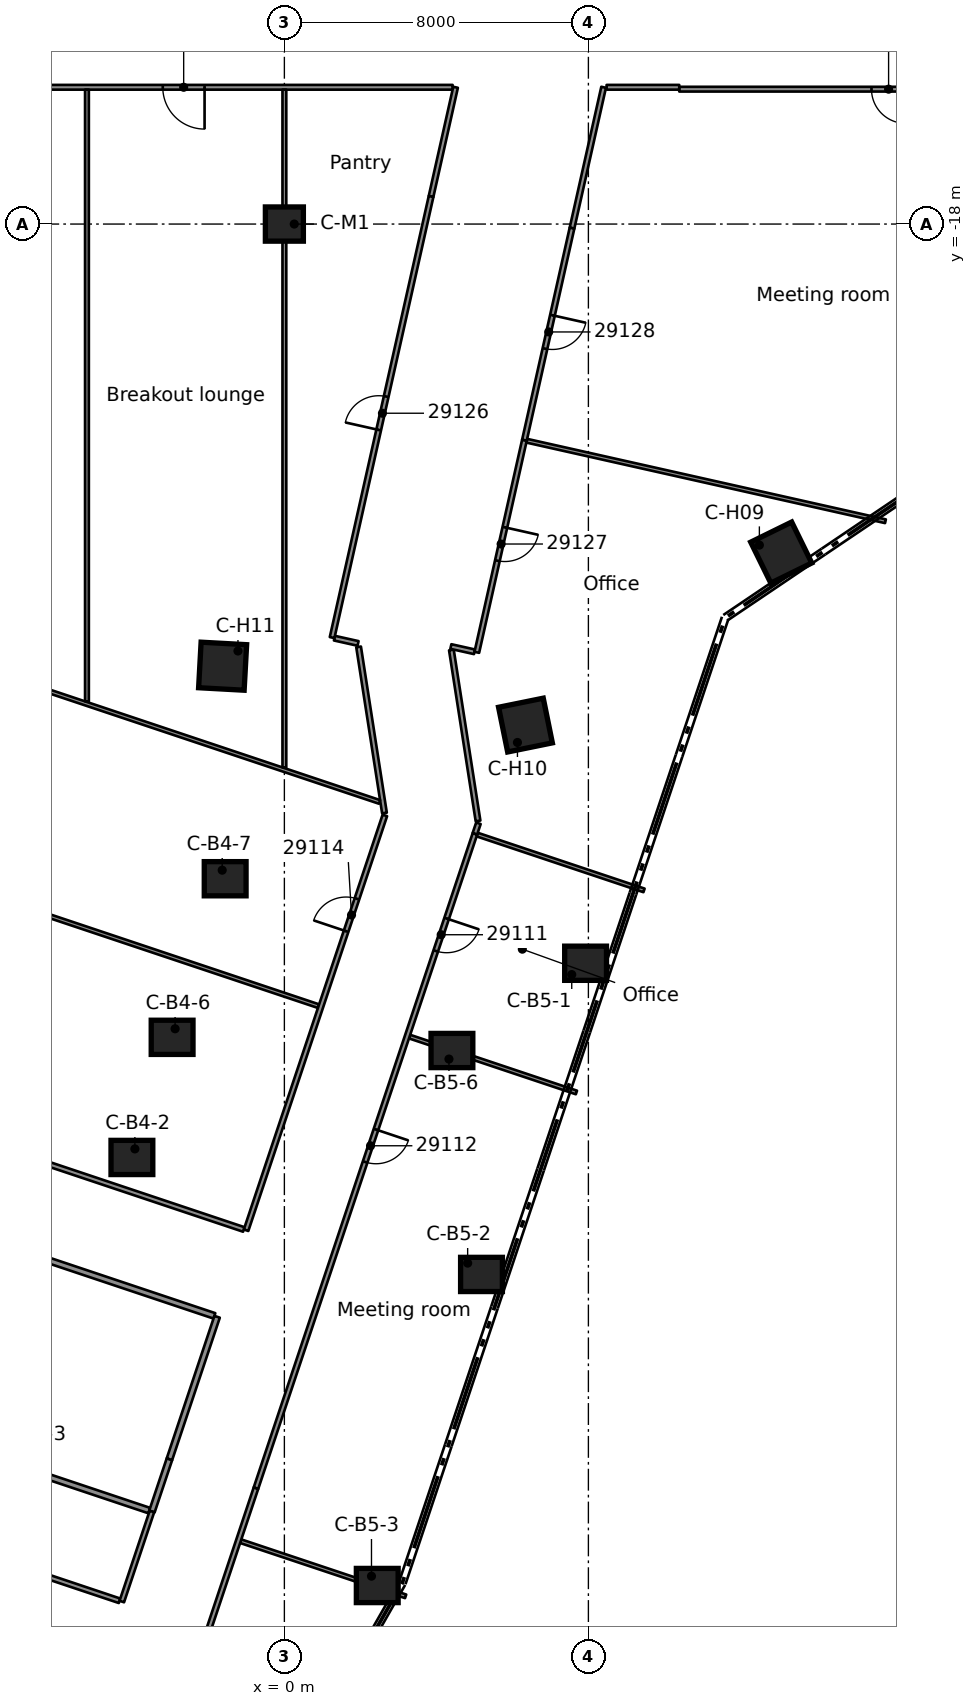
"""IFC4 building model, lengths in metres.
Left out: names, types, materials, properties, quantities, classifications, styles, units other than length and angle.
Written with IfcOpenShell. Run it as: python <this file> out.ifc"""

import sys

from ifc_helpers import new_model, si_unit, direction, frame, frame_2d, origin, origin_2d, place, context, subcontext, project, spatial, rectangle, extrude, element, fill, save


model = new_model("IFC4")
c1 = context("Model", 3, precision=1e-05, world=origin(), true_north=direction((0.0, 1.0)))
c2 = subcontext(c1, "Body", "Model", "MODEL_VIEW")
j1 = project(units=[si_unit("LENGTHUNIT", "METRE"), si_unit("PLANEANGLEUNIT", "RADIAN")], contexts=[c1])
p1 = place(None, origin())
s1 = spatial("IfcSite", under=j1, at=p1, CompositionType="ELEMENT")
p2 = place(p1, origin())
s2 = spatial("IfcBuilding", under=s1, at=p2, CompositionType="ELEMENT")
p3 = place(p2, frame((0.0, 0.0, 149.1)))
s3 = spatial("IfcBuildingStorey", under=s2, at=p3, CompositionType="ELEMENT", Elevation=149.1)
for number, where, z_axis, x_axis in (
    (1, (-4.012, -42.56, 0.0), (0.0, 0.0, 1.0), (1.0, 0.0, 0.0)),
    (2, (-2.954, -39.399, 0.0), (0.0, 0.0, 1.0), (1.0, 0.0, 0.0)),
    (3, (-1.558, -35.226, 0.0), (0.0, 0.0, 1.0), (1.0, 0.0, 0.0)),
    (4, (7.926, -37.45, 0.0), (0.0, 0.0, 1.0), (1.0, 0.0, 0.0)),
    (5, (5.187, -45.638, 0.0), (0.0, 0.0, 1.0), (1.0, 0.0, 0.0)),
    (6, (2.444, -53.823, 0.0), (0.0, 0.0, 1.0), (1.0, 0.0, 0.0)),
    (7, (4.409, -39.746, 0.0), (0.0, 0.0, 1.0), (1.0, 0.0, 0.0)),
):
    element("IfcColumn", number, at=place(p3, frame(where, z_axis=z_axis, x_axis=x_axis)), inside=s3, PredefinedType="COLUMN", context=c2, shape_type="SweptSolid", body=[
        extrude(rectangle(XDim=1.1, YDim=0.9, at=origin_2d()), origin(), (0.0, 0.0, 1.0), 3.5),
    ])
for number, where, z_axis, x_axis in (
    (8, (13.075, -26.644, 0.0), (0.0, 0.0, 1.0), (0.441, -0.898, 0.0)),
    (9, (6.344, -31.183, 0.0), (0.0, 0.0, 1.0), (0.199, -0.98, 0.0)),
    (10, (-1.625, -29.634, 0.0), (0.0, 0.0, 1.0), (-0.055, -0.998, 0.0)),
):
    element("IfcColumn", number, at=place(p3, frame(where, z_axis=z_axis, x_axis=x_axis)), inside=s3, PredefinedType="COLUMN", context=c2, shape_type="SweptSolid", body=[
        extrude(rectangle(XDim=1.2, YDim=1.2, at=origin_2d()), origin(), (0.0, 0.0, 1.0), 3.5),
    ])
p4 = place(p3, frame((0.0, -18.0, 0.0), z_axis=(0.0, 0.0, 1.0), x_axis=(1.0, 0.0, 0.0)))
e11 = element("IfcColumn", 11, at=p4, inside=s3, PredefinedType="COLUMN", context=c2, shape_type="SweptSolid", body=[
    extrude(rectangle(XDim=1.0, YDim=0.9, at=origin_2d()), origin(), (0.0, 0.0, 1.0), 3.5),
])
p5 = place(p3, frame((2.634, -33.497, 0.0), z_axis=(0.0, 0.0, 1.0), x_axis=(-0.153972826204, 0.988075082567, 0.0)))
e12 = element("IfcWall", 12, at=p5, inside=s3, PredefinedType="PARTITIONING", context=c2, shape_type="SweptSolid", body=[
    extrude(rectangle(XDim=4.424, YDim=0.125, at=frame_2d((2.212, 0.0))), origin(), (0.0, 0.0, 1.0), 3.08),
])
p6 = place(p3, frame((4.395, -29.207, 0.0), z_axis=(0.0, 0.0, 1.0), x_axis=(0.153971141753, -0.988075345056, 0.0)))
e13 = element("IfcWall", 13, at=p6, inside=s3, PredefinedType="PARTITIONING", context=c2, shape_type="SweptSolid", body=[
    extrude(rectangle(XDim=4.552, YDim=0.125, at=frame_2d((2.276, 0.0))), origin(), (0.0, 0.0, 1.0), 3.08),
])
p7 = place(p3, frame((-2.94, -57.547, 0.0), z_axis=(0.0, 0.0, 1.0), x_axis=(-0.948265401731, 0.317478704609, 0.0)))
e14 = element("IfcWall", 14, at=p7, inside=s3, PredefinedType="PARTITIONING", context=c2, shape_type="SweptSolid", body=[
    extrude(rectangle(XDim=30.966, YDim=0.125, at=frame_2d((15.483, 0.0))), origin(), (0.0, 0.0, 1.0), 3.08),
])
p8 = place(p7, frame((9.415, 0.0, 0.0)))
e15 = element("IfcOpeningElement", 15, at=p8, cuts=e14, PredefinedType="OPENING", context=c2, shape_type="SweptSolid", body=[
    extrude(rectangle(XDim=0.9, YDim=2.1, at=frame_2d((0.45, 1.05))), frame((0.0, 0.073, 0.0), z_axis=(0.0, -1.0, 0.0), x_axis=(1.0, 0.0, 0.0)), (0.0, 0.0, 1.0), 0.145),
])
p9 = place(p7, frame((19.9, 0.0, 0.0)))
e16 = element("IfcOpeningElement", 16, at=p9, cuts=e14, PredefinedType="OPENING", context=c2, shape_type="SweptSolid", body=[
    extrude(rectangle(XDim=1.1, YDim=2.1, at=frame_2d((0.55, 1.05))), frame((0.0, 0.073, 0.0), z_axis=(0.0, -1.0, 0.0), x_axis=(1.0, 0.0, 0.0)), (0.0, 0.0, 1.0), 0.145),
])
p10 = place(p3, frame((-29.171, -45.917, 0.0), z_axis=(0.0, 0.0, 1.0), x_axis=(0.948337781815, -0.317262433299, 0.0)))
e17 = element("IfcWall", 17, at=p10, inside=s3, PredefinedType="PARTITIONING", context=c2, shape_type="SweptSolid", body=[
    extrude(rectangle(XDim=26.187, YDim=0.125, at=frame_2d((13.093, 0.0))), origin(), (0.0, 0.0, 1.0), 3.08),
])
p11 = place(p10, frame((12.538, 0.0, 0.0)))
e18 = element("IfcOpeningElement", 18, at=p11, cuts=e17, PredefinedType="OPENING", context=c2, shape_type="SweptSolid", body=[
    extrude(rectangle(XDim=0.9, YDim=2.1, at=frame_2d((0.45, 1.05))), frame((0.0, 0.073, 0.0), z_axis=(0.0, -1.0, 0.0), x_axis=(1.0, 0.0, 0.0)), (0.0, 0.0, 1.0), 0.145),
])
p12 = place(p3, frame((-28.366, -43.55, 0.0), z_axis=(0.0, 0.0, 1.0), x_axis=(0.948327152728, -0.317294203223, 0.0)))
e19 = element("IfcWall", 19, at=p12, inside=s3, PredefinedType="PARTITIONING", context=c2, shape_type="SweptSolid", body=[
    extrude(rectangle(XDim=26.162, YDim=0.15, at=frame_2d((13.081, 0.0))), origin(), (0.0, 0.0, 1.0), 3.08),
])
p13 = place(p3, frame((-1.149, -52.657, 0.0), z_axis=(0.0, 0.0, 1.0), x_axis=(0.948400148701, -0.317075949805, 0.0)))
e20 = element("IfcWall", 20, at=p13, inside=s3, PredefinedType="PARTITIONING", context=c2, shape_type="SweptSolid", body=[
    extrude(rectangle(XDim=4.576, YDim=0.1, at=frame_2d((2.288, 0.0))), origin(), (0.0, 0.0, 1.0), 3.08),
])
p14 = place(p3, frame((-1.841, -46.728, 0.0), z_axis=(0.0, 0.0, 1.0), x_axis=(-0.94832621322, 0.317297011205, 0.0)))
e21 = element("IfcWall", 21, at=p14, inside=s3, PredefinedType="PARTITIONING", context=c2, shape_type="SweptSolid", body=[
    extrude(rectangle(XDim=26.162, YDim=0.15, at=frame_2d((13.081, 0.0))), origin(), (0.0, 0.0, 1.0), 3.08),
])
p15 = place(p14, frame((12.525, 0.0, 0.0)))
e22 = element("IfcOpeningElement", 22, at=p15, cuts=e21, PredefinedType="OPENING", context=c2, shape_type="SweptSolid", body=[
    extrude(rectangle(XDim=0.9, YDim=2.1, at=frame_2d((0.45, 1.05))), frame((0.0, 0.085, 0.0), z_axis=(0.0, -1.0, 0.0), x_axis=(1.0, 0.0, 0.0)), (0.0, 0.0, 1.0), 0.17),
])
p16 = place(p3, frame((-25.901, -36.146, 0.0), z_axis=(0.0, 0.0, 1.0), x_axis=(0.948326561211, -0.317295971139, 0.0)))
e23 = element("IfcWall", 23, at=p16, inside=s3, PredefinedType="PARTITIONING", context=c2, shape_type="SweptSolid", body=[
    extrude(rectangle(XDim=26.187, YDim=0.125, at=frame_2d((13.094, 0.0))), origin(), (0.0, 0.0, 1.0), 3.08),
])
p17 = place(p3, frame((-23.935, -30.27, 0.0), z_axis=(0.0, 0.0, 1.0), x_axis=(0.948326561211, -0.317295971139, 0.0)))
e24 = element("IfcWall", 24, at=p17, inside=s3, PredefinedType="PARTITIONING", context=c2, shape_type="SweptSolid", body=[
    extrude(rectangle(XDim=26.187, YDim=0.1, at=frame_2d((13.094, 0.0))), origin(), (0.0, 0.0, 1.0), 3.08),
])
p18 = place(p3, frame((3.294, -39.38, 0.0), z_axis=(0.0, 0.0, 1.0), x_axis=(0.948260676976, -0.317492816455, 0.0)))
e25 = element("IfcWall", 25, at=p18, inside=s3, PredefinedType="PARTITIONING", context=c2, shape_type="SweptSolid", body=[
    extrude(rectangle(XDim=4.631, YDim=0.1, at=frame_2d((2.315, 0.0))), origin(), (0.0, 0.0, 1.0), 3.08),
])
p19 = place(p3, frame((-21.98, -25.012, 0.0), z_axis=(0.0, 0.0, 1.0), x_axis=(0.948312916699, -0.317336748614, 0.0)))
e26 = element("IfcWall", 26, at=p19, inside=s3, PredefinedType="PARTITIONING", context=c2, shape_type="SweptSolid", body=[
    extrude(rectangle(XDim=25.818, YDim=0.1, at=frame_2d((12.909, 0.0))), origin(), (0.0, 0.0, 1.0), 3.08),
])
p20 = place(p3, frame((5.072, -34.064, 0.0), z_axis=(0.0, 0.0, 1.0), x_axis=(0.948361239818, -0.317192305725, 0.0)))
e27 = element("IfcWall", 27, at=p20, inside=s3, PredefinedType="PARTITIONING", context=c2, shape_type="SweptSolid", body=[
    extrude(rectangle(XDim=4.631, YDim=0.1, at=frame_2d((2.316, 0.0))), origin(), (0.0, 0.0, 1.0), 3.08),
])
p21 = place(p3, frame((6.378, -23.701, 0.0), z_axis=(0.0, 0.0, 1.0), x_axis=(0.975712069102, -0.219056974802, 0.0)))
e28 = element("IfcWall", 28, at=p21, inside=s3, PredefinedType="PARTITIONING", context=c2, shape_type="SweptSolid", body=[
    extrude(rectangle(XDim=9.674, YDim=0.1, at=frame_2d((4.837, 0.0))), origin(), (0.0, 0.0, 1.0), 3.08),
])
p22 = place(p3, frame((1.317, -28.896, 0.0), z_axis=(0.0, 0.0, 1.0), x_axis=(0.9759612217, -0.217944244563, 0.0)))
e29 = element("IfcWall", 29, at=p22, inside=s3, PredefinedType="PARTITIONING", context=c2, shape_type="SweptSolid", body=[
    extrude(rectangle(XDim=0.637, YDim=0.125, at=frame_2d((0.319, 0.0))), origin(), (0.0, 0.0, 1.0), 3.08),
])
p23 = place(p3, frame((4.381, -29.116, 0.0), z_axis=(0.0, 0.0, 1.0), x_axis=(0.975943017671, -0.218025746782, 0.0)))
e30 = element("IfcWall", 30, at=p23, inside=s3, PredefinedType="PARTITIONING", context=c2, shape_type="SweptSolid", body=[
    extrude(rectangle(XDim=0.637, YDim=0.125, at=frame_2d((0.319, 0.0))), origin(), (0.0, 0.0, 1.0), 3.08),
])
p24 = place(p3, frame((21.387, -14.451, 0.0), z_axis=(0.0, 0.0, 1.0), x_axis=(-1.0, 0.0, 0.0)))
e31 = element("IfcWall", 31, at=p24, inside=s3, PredefinedType="PARTITIONING", context=c2, shape_type="SweptSolid", body=[
    extrude(rectangle(XDim=10.996, YDim=0.125, at=frame_2d((5.498, 0.0))), origin(), (0.0, 0.0, 1.0), 3.08),
])
p25 = place(p24, frame((5.038, 0.0, 0.0)))
e32 = element("IfcOpeningElement", 32, at=p25, cuts=e31, PredefinedType="OPENING", context=c2, shape_type="SweptSolid", body=[
    extrude(rectangle(XDim=0.9, YDim=2.1, at=frame_2d((0.45, 1.05))), frame((0.0, 0.073, 0.0), z_axis=(0.0, -1.0, 0.0), x_axis=(1.0, 0.0, 0.0)), (0.0, 0.0, 1.0), 0.145),
])
p26 = place(p3, frame((4.427, -14.401, 0.0), z_axis=(0.0, 0.0, 1.0), x_axis=(-1.0, 0.0, 0.0)))
e33 = element("IfcWall", 33, at=p26, inside=s3, PredefinedType="PARTITIONING", context=c2, shape_type="SweptSolid", body=[
    extrude(rectangle(XDim=14.817, YDim=0.125, at=frame_2d((7.408, 0.0))), origin(), (0.0, 0.0, 1.0), 3.08),
])
p27 = place(p26, frame((11.722, 0.0, 0.0)))
e34 = element("IfcOpeningElement", 34, at=p27, cuts=e33, PredefinedType="OPENING", context=c2, shape_type="SweptSolid", body=[
    extrude(rectangle(XDim=0.9, YDim=2.1, at=frame_2d((0.45, 1.05))), frame((0.0, 0.073, 0.0), z_axis=(0.0, -1.0, 0.0), x_axis=(1.0, 0.0, 0.0)), (0.0, 0.0, 1.0), 0.145),
])
p28 = place(p26, frame((6.527, 0.0, 0.0)))
e35 = element("IfcOpeningElement", 35, at=p28, cuts=e33, PredefinedType="OPENING", context=c2, shape_type="SweptSolid", body=[
    extrude(rectangle(XDim=1.1, YDim=2.1, at=frame_2d((0.55, 1.05))), frame((0.0, 0.073, 0.0), z_axis=(0.0, -1.0, 0.0), x_axis=(1.0, 0.0, 0.0)), (0.0, 0.0, 1.0), 0.145),
])
p29 = place(p3, frame((8.479, -14.401, 0.0), z_axis=(0.0, 0.0, 1.0), x_axis=(1.0, 0.0, 0.0)))
e36 = element("IfcWall", 36, at=p29, inside=s3, PredefinedType="PARTITIONING", context=c2, shape_type="SweptSolid", body=[
    extrude(rectangle(XDim=1.912, YDim=0.125, at=frame_2d((0.956, 0.0))), origin(), (0.0, 0.0, 1.0), 3.08),
])
p30 = place(p3, frame((-2.858, -57.568, 0.0), z_axis=(0.0, 0.0, 1.0), x_axis=(0.317328623894, 0.94831563546, 0.0)))
e37 = element("IfcWall", 37, at=p30, inside=s3, PredefinedType="PARTITIONING", context=c2, shape_type="SweptSolid", body=[
    extrude(rectangle(XDim=6.652, YDim=0.125, at=frame_2d((3.326, 0.0))), origin(), (0.0, 0.0, 1.0), 3.08),
])
p31 = place(p3, frame((5.013, -34.044, 0.0), z_axis=(0.0, 0.0, 1.0), x_axis=(0.318483843222, 0.947928289274, 0.0)))
e38 = element("IfcWall", 38, at=p31, inside=s3, PredefinedType="PARTITIONING", context=c2, shape_type="SweptSolid", body=[
    extrude(rectangle(XDim=0.292, YDim=0.125, at=frame_2d((0.146, 0.0))), origin(), (0.0, 0.0, 1.0), 3.08),
])
p32 = place(p3, frame((5.014, -34.047, 0.0), z_axis=(0.0, 0.0, 1.0), x_axis=(-0.317385597106, -0.948296568986, 0.0)))
e39 = element("IfcWall", 39, at=p32, inside=s3, PredefinedType="PARTITIONING", context=c2, shape_type="SweptSolid", body=[
    extrude(rectangle(XDim=18.151, YDim=0.125, at=frame_2d((9.076, 0.0))), origin(), (0.0, 0.0, 1.0), 3.08),
])
p33 = place(p32, frame((2.347, 0.0, 0.0)))
e40 = element("IfcOpeningElement", 40, at=p33, cuts=e39, PredefinedType="OPENING", context=c2, shape_type="SweptSolid", body=[
    extrude(rectangle(XDim=0.9, YDim=2.1, at=frame_2d((0.45, 1.05))), frame((0.0, 0.073, 0.0), z_axis=(0.0, -1.0, 0.0), x_axis=(1.0, 0.0, 0.0)), (0.0, 0.0, 1.0), 0.145),
])
p34 = place(p32, frame((8.203, 0.0, 0.0)))
e41 = element("IfcOpeningElement", 41, at=p34, cuts=e39, PredefinedType="OPENING", context=c2, shape_type="SweptSolid", body=[
    extrude(rectangle(XDim=0.9, YDim=2.1, at=frame_2d((0.45, 1.05))), frame((0.0, 0.073, 0.0), z_axis=(0.0, -1.0, 0.0), x_axis=(1.0, 0.0, 0.0)), (0.0, 0.0, 1.0), 0.145),
])
p35 = place(p3, frame((-3.485, -51.875, 0.0), z_axis=(0.0, 0.0, 1.0), x_axis=(0.317791901712, 0.948160485997, 0.0)))
e42 = element("IfcWall", 42, at=p35, inside=s3, PredefinedType="PARTITIONING", context=c2, shape_type="SweptSolid", body=[
    extrude(rectangle(XDim=1.451, YDim=0.15, at=frame_2d((0.726, 0.0))), origin(), (0.0, 0.0, 1.0), 3.08),
])
p36 = place(p3, frame((-4.278, -54.245, 0.0), z_axis=(0.0, 0.0, 1.0), x_axis=(0.31728257411, 0.948331043553, 0.0)))
e43 = element("IfcWall", 43, at=p36, inside=s3, PredefinedType="PARTITIONING", context=c2, shape_type="SweptSolid", body=[
    extrude(rectangle(XDim=2.499, YDim=0.125, at=frame_2d((1.25, 0.0))), origin(), (0.0, 0.0, 1.0), 3.08),
])
p37 = place(p3, frame((-3.024, -50.499, 0.0), z_axis=(0.0, 0.0, 1.0), x_axis=(0.317339720629, 0.94831192216, 0.0)))
e44 = element("IfcWall", 44, at=p37, inside=s3, PredefinedType="PARTITIONING", context=c2, shape_type="SweptSolid", body=[
    extrude(rectangle(XDim=3.951, YDim=0.15, at=frame_2d((1.976, 0.0))), origin(), (0.0, 0.0, 1.0), 3.08),
])
p38 = place(p3, frame((-1.008, -44.475, 0.0), z_axis=(0.0, 0.0, 1.0), x_axis=(0.317302986419, 0.948324213974, 0.0)))
e45 = element("IfcWall", 45, at=p38, inside=s3, PredefinedType="PARTITIONING", context=c2, shape_type="SweptSolid", body=[
    extrude(rectangle(XDim=11.51, YDim=0.125, at=frame_2d((5.755, 0.0))), origin(), (0.0, 0.0, 1.0), 3.08),
])
p39 = place(p38, frame((8.296, 0.0, 0.0)))
e46 = element("IfcOpeningElement", 46, at=p39, cuts=e45, PredefinedType="OPENING", context=c2, shape_type="SweptSolid", body=[
    extrude(rectangle(XDim=0.9, YDim=2.1, at=frame_2d((0.45, 1.05))), frame((0.0, 0.073, 0.0), z_axis=(0.0, -1.0, 0.0), x_axis=(1.0, 0.0, 0.0)), (0.0, 0.0, 1.0), 0.145),
])
p40 = place(p3, frame((6.317, -23.687, 0.0), z_axis=(0.0, 0.0, 1.0), x_axis=(-0.21900849334, -0.975722952402, 0.0)))
e47 = element("IfcWall", 47, at=p40, inside=s3, PredefinedType="PARTITIONING", context=c2, shape_type="SweptSolid", body=[
    extrude(rectangle(XDim=5.721, YDim=0.125, at=frame_2d((2.86, 0.0))), origin(), (0.0, 0.0, 1.0), 3.08),
])
p41 = place(p40, frame((2.35, 0.0, 0.0)))
e48 = element("IfcOpeningElement", 48, at=p41, cuts=e47, PredefinedType="OPENING", context=c2, shape_type="SweptSolid", body=[
    extrude(rectangle(XDim=0.9, YDim=2.1, at=frame_2d((0.45, 1.05))), frame((0.0, 0.073, 0.0), z_axis=(0.0, -1.0, 0.0), x_axis=(1.0, 0.0, 0.0)), (0.0, 0.0, 1.0), 0.145),
])
p42 = place(p3, frame((7.569, -18.107, 0.0), z_axis=(0.0, 0.0, 1.0), x_axis=(0.218992134919, 0.975726624031, 0.0)))
e49 = element("IfcWall", 49, at=p42, inside=s3, PredefinedType="PARTITIONING", context=c2, shape_type="SweptSolid", body=[
    extrude(rectangle(XDim=3.798, YDim=0.125, at=frame_2d((1.899, 0.0))), origin(), (0.0, 0.0, 1.0), 3.08),
])
p43 = place(p3, frame((3.86, -17.274, 0.0), z_axis=(0.0, 0.0, 1.0), x_axis=(0.218975515368, 0.975730353976, 0.0)))
e50 = element("IfcWall", 50, at=p43, inside=s3, PredefinedType="PARTITIONING", context=c2, shape_type="SweptSolid", body=[
    extrude(rectangle(XDim=2.945, YDim=0.125, at=frame_2d((1.472, 0.0))), origin(), (0.0, 0.0, 1.0), 3.08),
])
p44 = place(p3, frame((7.569, -18.107, 0.0), z_axis=(0.0, 0.0, 1.0), x_axis=(-0.218959545299, -0.975733937876, 0.0)))
e51 = element("IfcWall", 51, at=p44, inside=s3, PredefinedType="PARTITIONING", context=c2, shape_type="SweptSolid", body=[
    extrude(rectangle(XDim=5.719, YDim=0.125, at=frame_2d((2.859, 0.0))), origin(), (0.0, 0.0, 1.0), 3.08),
])
p45 = place(p44, frame((2.35, 0.0, 0.0)))
e52 = element("IfcOpeningElement", 52, at=p45, cuts=e51, PredefinedType="OPENING", context=c2, shape_type="SweptSolid", body=[
    extrude(rectangle(XDim=0.9, YDim=2.1, at=frame_2d((0.45, 1.05))), frame((0.0, 0.073, 0.0), z_axis=(0.0, -1.0, 0.0), x_axis=(1.0, 0.0, 0.0)), (0.0, 0.0, 1.0), 0.145),
])
p46 = place(p3, frame((1.256, -28.881, 0.0), z_axis=(0.0, 0.0, 1.0), x_axis=(0.218920699835, 0.975742654179, 0.0)))
e53 = element("IfcWall", 53, at=p46, inside=s3, PredefinedType="PARTITIONING", context=c2, shape_type="SweptSolid", body=[
    extrude(rectangle(XDim=11.895, YDim=0.125, at=frame_2d((5.947, 0.0))), origin(), (0.0, 0.0, 1.0), 3.08),
])
p47 = place(p46, frame((5.6, 0.0, 0.0)))
e54 = element("IfcOpeningElement", 54, at=p47, cuts=e53, PredefinedType="OPENING", context=c2, shape_type="SweptSolid", body=[
    extrude(rectangle(XDim=0.9, YDim=2.1, at=frame_2d((0.45, 1.05))), frame((0.0, 0.073, 0.0), z_axis=(0.0, -1.0, 0.0), x_axis=(1.0, 0.0, 0.0)), (0.0, 0.0, 1.0), 0.145),
])
p48 = place(p3, frame((0.0, -32.297, 0.0), z_axis=(0.0, 0.0, 1.0), x_axis=(0.0, 1.0, 0.0)))
e55 = element("IfcWall", 55, at=p48, inside=s3, PredefinedType="PARTITIONING", context=c2, shape_type="SweptSolid", body=[
    extrude(rectangle(XDim=17.834, YDim=0.1, at=frame_2d((8.917, 0.0))), origin(), (0.0, 0.0, 1.0), 3.08),
])
p49 = place(p3, frame((-5.195, -30.559, 0.0), z_axis=(0.0, 0.0, 1.0), x_axis=(0.0, 1.0, 0.0)))
e56 = element("IfcWall", 56, at=p49, inside=s3, PredefinedType="PARTITIONING", context=c2, shape_type="SweptSolid", body=[
    extrude(rectangle(XDim=16.096, YDim=0.1, at=frame_2d((8.048, 0.0))), origin(), (0.0, 0.0, 1.0), 3.08),
])
p50 = place(p33, origin())
e57 = element("IfcDoor", 57, at=p50, inside=s3, OperationType="SINGLE_SWING_LEFT", PredefinedType="DOOR", context=c2, shape_type="SweptSolid", body=[
    extrude(rectangle(XDim=0.9, YDim=2.1, at=frame_2d((0.45, 1.05))), frame((0.0, 0.025, 0.0), z_axis=(0.0, -1.0, 0.0), x_axis=(1.0, 0.0, 0.0)), (0.0, 0.0, 1.0), 0.05),
])
fill(e40, e57)
p51 = place(p34, origin())
e58 = element("IfcDoor", 58, at=p51, inside=s3, OperationType="SINGLE_SWING_LEFT", PredefinedType="DOOR", context=c2, shape_type="SweptSolid", body=[
    extrude(rectangle(XDim=0.9, YDim=2.1, at=frame_2d((0.45, 1.05))), frame((0.0, 0.025, 0.0), z_axis=(0.0, -1.0, 0.0), x_axis=(1.0, 0.0, 0.0)), (0.0, 0.0, 1.0), 0.05),
])
fill(e41, e58)
p52 = place(p39, origin())
e59 = element("IfcDoor", 59, at=p52, inside=s3, OperationType="SINGLE_SWING_RIGHT", PredefinedType="DOOR", context=c2, shape_type="SweptSolid", body=[
    extrude(rectangle(XDim=0.9, YDim=2.1, at=frame_2d((0.45, 1.05))), frame((0.0, 0.025, 0.0), z_axis=(0.0, -1.0, 0.0), x_axis=(1.0, 0.0, 0.0)), (0.0, 0.0, 1.0), 0.05),
])
fill(e46, e59)
p53 = place(p28, origin())
e60 = element("IfcDoor", 60, at=p53, inside=s3, OperationType="SINGLE_SWING_LEFT", PredefinedType="DOOR", context=c2, shape_type="SweptSolid", body=[
    extrude(rectangle(XDim=1.1, YDim=2.1, at=frame_2d((0.55, 1.05))), frame((0.0, 0.025, 0.0), z_axis=(0.0, -1.0, 0.0), x_axis=(1.0, 0.0, 0.0)), (0.0, 0.0, 1.0), 0.05),
])
fill(e35, e60)
p54 = place(p47, origin())
e61 = element("IfcDoor", 61, at=p54, inside=s3, OperationType="SINGLE_SWING_RIGHT", PredefinedType="DOOR", context=c2, shape_type="SweptSolid", body=[
    extrude(rectangle(XDim=0.9, YDim=2.1, at=frame_2d((0.45, 1.05))), frame((0.0, 0.025, 0.0), z_axis=(0.0, -1.0, 0.0), x_axis=(1.0, 0.0, 0.0)), (0.0, 0.0, 1.0), 0.05),
])
fill(e54, e61)
p55 = place(p41, origin())
e62 = element("IfcDoor", 62, at=p55, inside=s3, OperationType="SINGLE_SWING_LEFT", PredefinedType="DOOR", context=c2, shape_type="SweptSolid", body=[
    extrude(rectangle(XDim=0.9, YDim=2.1, at=frame_2d((0.45, 1.05))), frame((0.0, 0.025, 0.0), z_axis=(0.0, -1.0, 0.0), x_axis=(1.0, 0.0, 0.0)), (0.0, 0.0, 1.0), 0.05),
])
fill(e48, e62)
p56 = place(p45, origin())
e63 = element("IfcDoor", 63, at=p56, inside=s3, OperationType="SINGLE_SWING_LEFT", PredefinedType="DOOR", context=c2, shape_type="SweptSolid", body=[
    extrude(rectangle(XDim=0.9, YDim=2.1, at=frame_2d((0.45, 1.05))), frame((0.0, 0.025, 0.0), z_axis=(0.0, -1.0, 0.0), x_axis=(1.0, 0.0, 0.0)), (0.0, 0.0, 1.0), 0.05),
])
fill(e52, e63)
p57 = place(p25, origin())
e64 = element("IfcDoor", 64, at=p57, inside=s3, OperationType="SINGLE_SWING_LEFT", PredefinedType="DOOR", context=c2, shape_type="SweptSolid", body=[
    extrude(rectangle(XDim=0.9, YDim=2.1, at=frame_2d((0.45, 1.05))), frame((0.0, 0.025, 0.0), z_axis=(0.0, -1.0, 0.0), x_axis=(1.0, 0.0, 0.0)), (0.0, 0.0, 1.0), 0.05),
])
fill(e32, e64)
save(model, sys.argv[1])
